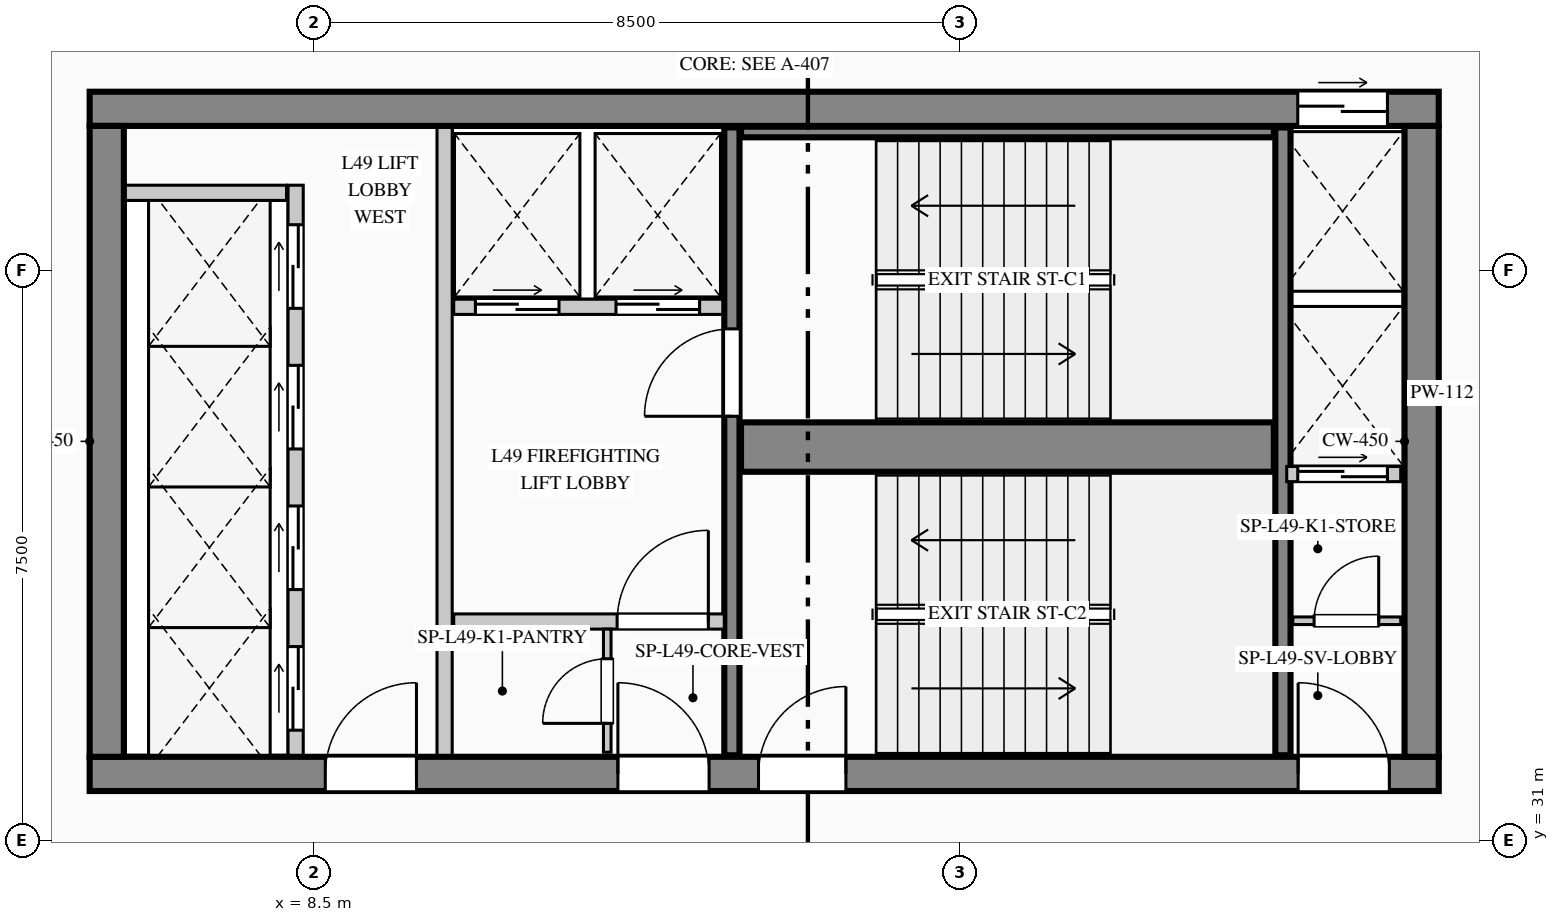
"""IFC4 building model, lengths in metres.
Left out: names, types, materials, properties, quantities, classifications, styles, units other than length and angle.
Written with IfcOpenShell. Run it as: python <this file> out.ifc"""

import sys

from ifc_helpers import new_model, si_unit, direction, frame, frame_2d, origin, place, context, subcontext, project, spatial, rectangle, extrude, element, fill, save


model = new_model("IFC4")
c1 = context("Model", 3, precision=1e-05, world=origin(), true_north=direction((0.0, 1.0)))
c2 = subcontext(c1, "Body", "Model", "MODEL_VIEW")
j1 = project(units=[si_unit("LENGTHUNIT", "METRE"), si_unit("PLANEANGLEUNIT", "RADIAN")], contexts=[c1])
p1 = place(None, origin())
s1 = spatial("IfcSite", under=j1, at=p1, CompositionType="ELEMENT")
p2 = place(p1, origin())
s2 = spatial("IfcBuilding", under=s1, at=p2, CompositionType="ELEMENT")
p3 = place(p2, frame((0.0, 0.0, 207.45)))
s3 = spatial("IfcBuildingStorey", under=s2, at=p3, CompositionType="ELEMENT", Elevation=207.45)
p4 = place(p3, frame((5.55, 40.625, 0.0), z_axis=(0.0, 0.0, 1.0), x_axis=(1.0, 0.0, 0.0)))
e1 = element("IfcWall", 1, at=p4, inside=s3, PredefinedType="SHEAR", context=c2, shape_type="SweptSolid", body=[
    extrude(rectangle(XDim=17.75, YDim=0.45, at=frame_2d((8.875, 0.0))), origin(), (0.0, 0.0, 1.0), 3.95),
])
p5 = place(p4, frame((15.895, 0.0, 0.0)))
e2 = element("IfcOpeningElement", 2, at=p5, cuts=e1, PredefinedType="OPENING", context=c2, shape_type="SweptSolid", body=[
    extrude(rectangle(XDim=1.18, YDim=2.25, at=frame_2d((0.59, 1.125))), frame((0.0, 0.235, 0.0), z_axis=(0.0, -1.0, 0.0), x_axis=(1.0, 0.0, 0.0)), (0.0, 0.0, 1.0), 0.47),
])
p6 = place(p3, frame((5.55, 31.875, 0.0), z_axis=(0.0, 0.0, 1.0), x_axis=(1.0, 0.0, 0.0)))
e3 = element("IfcWall", 3, at=p6, inside=s3, PredefinedType="SHEAR", context=c2, shape_type="SweptSolid", body=[
    extrude(rectangle(XDim=17.75, YDim=0.45, at=frame_2d((8.875, 0.0))), origin(), (0.0, 0.0, 1.0), 3.95),
])
p7 = place(p6, frame((3.1, 0.0, 0.0)))
e4 = element("IfcOpeningElement", 4, at=p7, cuts=e3, PredefinedType="OPENING", context=c2, shape_type="SweptSolid", body=[
    extrude(rectangle(XDim=1.2, YDim=2.2, at=frame_2d((0.6, 1.1))), frame((0.0, 0.235, 0.0), z_axis=(0.0, -1.0, 0.0), x_axis=(1.0, 0.0, 0.0)), (0.0, 0.0, 1.0), 0.47),
])
p8 = place(p6, frame((6.95, 0.0, 0.0)))
e5 = element("IfcOpeningElement", 5, at=p8, cuts=e3, PredefinedType="OPENING", context=c2, shape_type="SweptSolid", body=[
    extrude(rectangle(XDim=1.2, YDim=2.2, at=frame_2d((0.6, 1.1))), frame((0.0, 0.235, 0.0), z_axis=(0.0, -1.0, 0.0), x_axis=(1.0, 0.0, 0.0)), (0.0, 0.0, 1.0), 0.47),
])
p9 = place(p6, frame((8.8, 0.0, 0.0)))
e6 = element("IfcOpeningElement", 6, at=p9, cuts=e3, PredefinedType="OPENING", context=c2, shape_type="SweptSolid", body=[
    extrude(rectangle(XDim=1.15, YDim=2.2, at=frame_2d((0.575, 1.1))), frame((0.0, 0.235, 0.0), z_axis=(0.0, -1.0, 0.0), x_axis=(1.0, 0.0, 0.0)), (0.0, 0.0, 1.0), 0.47),
])
p10 = place(p6, frame((15.9, 0.0, 0.0)))
e7 = element("IfcOpeningElement", 7, at=p10, cuts=e3, PredefinedType="OPENING", context=c2, shape_type="SweptSolid", body=[
    extrude(rectangle(XDim=1.2, YDim=2.2, at=frame_2d((0.6, 1.1))), frame((0.0, 0.235, 0.0), z_axis=(0.0, -1.0, 0.0), x_axis=(1.0, 0.0, 0.0)), (0.0, 0.0, 1.0), 0.47),
])
for number, where, z_axis, x_axis in (
    (8, (5.775, 32.1, 0.0), (0.0, 0.0, 1.0), (0.0, 1.0, 0.0)),
    (9, (23.075, 32.1, 0.0), (0.0, 0.0, 1.0), (0.0, 1.0, 0.0)),
):
    element("IfcWall", number, at=place(p3, frame(where, z_axis=z_axis, x_axis=x_axis)), inside=s3, PredefinedType="SHEAR", context=c2, shape_type="SweptSolid", body=[
        extrude(rectangle(XDim=8.3, YDim=0.45, at=frame_2d((4.15, 0.0))), origin(), (0.0, 0.0, 1.0), 3.95),
    ])
p11 = place(p3, frame((14.0, 32.12, 0.0), z_axis=(0.0, 0.0, 1.0), x_axis=(0.0, 1.0, 0.0)))
e10 = element("IfcWall", 10, at=p11, inside=s3, PredefinedType="SHEAR", context=c2, shape_type="SweptSolid", body=[
    extrude(rectangle(XDim=8.26, YDim=0.2, at=frame_2d((4.13, 0.0))), origin(), (0.0, 0.0, 1.0), 3.95),
])
p12 = place(p11, frame((4.46, 0.0, 0.0)))
e11 = element("IfcOpeningElement", 11, at=p12, cuts=e10, PredefinedType="OPENING", context=c2, shape_type="SweptSolid", body=[
    extrude(rectangle(XDim=1.15, YDim=2.2, at=frame_2d((0.575, 1.1))), frame((0.0, 0.11, 0.0), z_axis=(0.0, -1.0, 0.0), x_axis=(1.0, 0.0, 0.0)), (0.0, 0.0, 1.0), 0.22),
])
p13 = place(p3, frame((14.12, 36.175, 0.0), z_axis=(0.0, 0.0, 1.0), x_axis=(1.0, 0.0, 0.0)))
e12 = element("IfcWall", 12, at=p13, inside=s3, PredefinedType="SHEAR", context=c2, shape_type="SweptSolid", body=[
    extrude(rectangle(XDim=7.01, YDim=0.65, at=frame_2d((3.505, 0.0))), origin(), (0.0, 0.0, 1.0), 3.95),
])
p14 = place(p3, frame((21.25, 32.12, 0.0), z_axis=(0.0, 0.0, 1.0), x_axis=(0.0, 1.0, 0.0)))
e13 = element("IfcWall", 13, at=p14, inside=s3, PredefinedType="SHEAR", context=c2, shape_type="SweptSolid", body=[
    extrude(rectangle(XDim=8.26, YDim=0.2, at=frame_2d((4.13, 0.0))), origin(), (0.0, 0.0, 1.0), 3.95),
])
p15 = place(p3, frame((14.12, 40.32, 0.0), z_axis=(0.0, 0.0, 1.0), x_axis=(1.0, 0.0, 0.0)))
e14 = element("IfcWall", 14, at=p15, inside=s3, PredefinedType="SHEAR", context=c2, shape_type="SweptSolid", body=[
    extrude(rectangle(XDim=7.01, YDim=0.14, at=frame_2d((3.505, 0.0))), origin(), (0.0, 0.0, 1.0), 3.95),
])
p16 = place(p3, frame((7.46, 4.62, 0.0), z_axis=(0.0, 0.0, 1.0), x_axis=(-0.123515576323, 0.992342633573, 0.0)))
e15 = element("IfcWall", 15, at=p16, inside=s3, PredefinedType="STANDARD", context=c2, shape_type="SweptSolid", body=[
    extrude(rectangle(XDim=37.043, YDim=0.24, at=frame_2d((18.522, 0.0))), origin(), (0.0, 0.0, 1.0), 3.7),
])
p17 = place(p16, frame((10.032, 0.0, 0.9)))
e16 = element("IfcOpeningElement", 16, at=p17, cuts=e15, PredefinedType="OPENING", context=c2, shape_type="SweptSolid", body=[
    extrude(rectangle(XDim=2.7, YDim=2.1, at=frame_2d((1.35, 1.05))), frame((0.0, 0.13, 0.0), z_axis=(0.0, -1.0, 0.0), x_axis=(1.0, 0.0, 0.0)), (0.0, 0.0, 1.0), 0.26),
])
p18 = place(p3, frame((8.26, 32.12, 0.0), z_axis=(0.0, 0.0, 1.0), x_axis=(0.0, 1.0, 0.0)))
e17 = element("IfcWall", 17, at=p18, inside=s3, PredefinedType="PARTITIONING", context=c2, shape_type="SweptSolid", body=[
    extrude(rectangle(XDim=7.5, YDim=0.2, at=frame_2d((3.75, 0.0))), origin(), (0.0, 0.0, 1.0), 3.7),
])
p19 = place(p18, frame((0.33, 0.0, 0.0)))
e18 = element("IfcOpeningElement", 18, at=p19, cuts=e17, PredefinedType="OPENING", context=c2, shape_type="SweptSolid", body=[
    extrude(rectangle(XDim=1.1, YDim=2.2, at=frame_2d((0.55, 1.1))), frame((0.0, 0.11, 0.0), z_axis=(0.0, -1.0, 0.0), x_axis=(1.0, 0.0, 0.0)), (0.0, 0.0, 1.0), 0.22),
])
p20 = place(p18, frame((2.18, 0.0, 0.0)))
e19 = element("IfcOpeningElement", 19, at=p20, cuts=e17, PredefinedType="OPENING", context=c2, shape_type="SweptSolid", body=[
    extrude(rectangle(XDim=1.1, YDim=2.2, at=frame_2d((0.55, 1.1))), frame((0.0, 0.11, 0.0), z_axis=(0.0, -1.0, 0.0), x_axis=(1.0, 0.0, 0.0)), (0.0, 0.0, 1.0), 0.22),
])
p21 = place(p18, frame((4.03, 0.0, 0.0)))
e20 = element("IfcOpeningElement", 20, at=p21, cuts=e17, PredefinedType="OPENING", context=c2, shape_type="SweptSolid", body=[
    extrude(rectangle(XDim=1.1, YDim=2.2, at=frame_2d((0.55, 1.1))), frame((0.0, 0.11, 0.0), z_axis=(0.0, -1.0, 0.0), x_axis=(1.0, 0.0, 0.0)), (0.0, 0.0, 1.0), 0.22),
])
p22 = place(p18, frame((5.88, 0.0, 0.0)))
e21 = element("IfcOpeningElement", 21, at=p22, cuts=e17, PredefinedType="OPENING", context=c2, shape_type="SweptSolid", body=[
    extrude(rectangle(XDim=1.1, YDim=2.2, at=frame_2d((0.55, 1.1))), frame((0.0, 0.11, 0.0), z_axis=(0.0, -1.0, 0.0), x_axis=(1.0, 0.0, 0.0)), (0.0, 0.0, 1.0), 0.22),
])
p23 = place(p3, frame((6.02, 39.52, 0.0), z_axis=(0.0, 0.0, 1.0), x_axis=(1.0, 0.0, 0.0)))
e22 = element("IfcWall", 22, at=p23, inside=s3, PredefinedType="PARTITIONING", context=c2, shape_type="SweptSolid", body=[
    extrude(rectangle(XDim=2.12, YDim=0.2, at=frame_2d((1.06, 0.0))), origin(), (0.0, 0.0, 1.0), 3.7),
])
p24 = place(p3, frame((10.22, 32.12, 0.0), z_axis=(0.0, 0.0, 1.0), x_axis=(0.0, 1.0, 0.0)))
e23 = element("IfcWall", 23, at=p24, inside=s3, PredefinedType="PARTITIONING", context=c2, shape_type="SweptSolid", body=[
    extrude(rectangle(XDim=8.26, YDim=0.2, at=frame_2d((4.13, 0.0))), origin(), (0.0, 0.0, 1.0), 3.7),
])
p25 = place(p3, frame((10.34, 38.02, 0.0), z_axis=(0.0, 0.0, 1.0), x_axis=(1.0, 0.0, 0.0)))
e24 = element("IfcWall", 24, at=p25, inside=s3, PredefinedType="PARTITIONING", context=c2, shape_type="SweptSolid", body=[
    extrude(rectangle(XDim=3.54, YDim=0.2, at=frame_2d((1.77, 0.0))), origin(), (0.0, 0.0, 1.0), 3.7),
])
p26 = place(p25, frame((0.285, 0.0, 0.0)))
e25 = element("IfcOpeningElement", 25, at=p26, cuts=e24, PredefinedType="OPENING", context=c2, shape_type="SweptSolid", body=[
    extrude(rectangle(XDim=1.1, YDim=2.2, at=frame_2d((0.55, 1.1))), frame((0.0, 0.11, 0.0), z_axis=(0.0, -1.0, 0.0), x_axis=(1.0, 0.0, 0.0)), (0.0, 0.0, 1.0), 0.22),
])
p27 = place(p25, frame((2.135, 0.0, 0.0)))
e26 = element("IfcOpeningElement", 26, at=p27, cuts=e24, PredefinedType="OPENING", context=c2, shape_type="SweptSolid", body=[
    extrude(rectangle(XDim=1.1, YDim=2.2, at=frame_2d((0.55, 1.1))), frame((0.0, 0.11, 0.0), z_axis=(0.0, -1.0, 0.0), x_axis=(1.0, 0.0, 0.0)), (0.0, 0.0, 1.0), 0.22),
])
p28 = place(p3, frame((10.34, 33.88, 0.0), z_axis=(0.0, 0.0, 1.0), x_axis=(1.0, 0.0, 0.0)))
e27 = element("IfcWall", 27, at=p28, inside=s3, PredefinedType="PARTITIONING", context=c2, shape_type="SweptSolid", body=[
    extrude(rectangle(XDim=3.56, YDim=0.2, at=frame_2d((1.78, 0.0))), origin(), (0.0, 0.0, 1.0), 3.7),
])
p29 = place(p28, frame((2.15, 0.0, 0.0)))
e28 = element("IfcOpeningElement", 28, at=p29, cuts=e27, PredefinedType="OPENING", context=c2, shape_type="SweptSolid", body=[
    extrude(rectangle(XDim=1.2, YDim=2.2, at=frame_2d((0.6, 1.1))), frame((0.0, 0.11, 0.0), z_axis=(0.0, -1.0, 0.0), x_axis=(1.0, 0.0, 0.0)), (0.0, 0.0, 1.0), 0.22),
])
p30 = place(p3, frame((12.36, 32.16, 0.0), z_axis=(0.0, 0.0, 1.0), x_axis=(0.0, 1.0, 0.0)))
e29 = element("IfcWall", 29, at=p30, inside=s3, PredefinedType="PARTITIONING", context=c2, shape_type="SweptSolid", body=[
    extrude(rectangle(XDim=1.62, YDim=0.1, at=frame_2d((0.81, 0.0))), origin(), (0.0, 0.0, 1.0), 3.7),
])
p31 = place(p30, frame((0.38, 0.0, 0.0)))
e30 = element("IfcOpeningElement", 30, at=p31, cuts=e29, PredefinedType="OPENING", context=c2, shape_type="SweptSolid", body=[
    extrude(rectangle(XDim=0.85, YDim=2.1, at=frame_2d((0.425, 1.05))), frame((0.0, 0.06, 0.0), z_axis=(0.0, -1.0, 0.0), x_axis=(1.0, 0.0, 0.0)), (0.0, 0.0, 1.0), 0.12),
])
p32 = place(p3, frame((21.38, 33.89, 0.0), z_axis=(0.0, 0.0, 1.0), x_axis=(1.0, 0.0, 0.0)))
e31 = element("IfcWall", 31, at=p32, inside=s3, PredefinedType="PARTITIONING", context=c2, shape_type="SweptSolid", body=[
    extrude(rectangle(XDim=1.42, YDim=0.1, at=frame_2d((0.71, 0.0))), origin(), (0.0, 0.0, 1.0), 3.7),
])
p33 = place(p32, frame((0.28, 0.0, 0.0)))
e32 = element("IfcOpeningElement", 32, at=p33, cuts=e31, PredefinedType="OPENING", context=c2, shape_type="SweptSolid", body=[
    extrude(rectangle(XDim=0.85, YDim=2.1, at=frame_2d((0.425, 1.05))), frame((0.0, 0.06, 0.0), z_axis=(0.0, -1.0, 0.0), x_axis=(1.0, 0.0, 0.0)), (0.0, 0.0, 1.0), 0.12),
])
p34 = place(p3, frame((21.3, 35.82, 0.0), z_axis=(0.0, 0.0, 1.0), x_axis=(1.0, 0.0, 0.0)))
e33 = element("IfcWall", 33, at=p34, inside=s3, PredefinedType="PARTITIONING", context=c2, shape_type="SweptSolid", body=[
    extrude(rectangle(XDim=1.5, YDim=0.2, at=frame_2d((0.75, 0.0))), origin(), (0.0, 0.0, 1.0), 3.7),
])
p35 = place(p34, frame((0.145, 0.0, 0.0)))
e34 = element("IfcOpeningElement", 34, at=p35, cuts=e33, PredefinedType="OPENING", context=c2, shape_type="SweptSolid", body=[
    extrude(rectangle(XDim=1.18, YDim=2.25, at=frame_2d((0.59, 1.125))), frame((0.0, 0.11, 0.0), z_axis=(0.0, -1.0, 0.0), x_axis=(1.0, 0.0, 0.0)), (0.0, 0.0, 1.0), 0.22),
])
p36 = place(p7, origin())
e35 = element("IfcDoor", 35, at=p36, inside=s3, OperationType="SINGLE_SWING_RIGHT", PredefinedType="DOOR", context=c2, shape_type="SweptSolid", body=[
    extrude(rectangle(XDim=1.2, YDim=2.2, at=frame_2d((0.6, 1.1))), frame((0.0, 0.025, 0.0), z_axis=(0.0, -1.0, 0.0), x_axis=(1.0, 0.0, 0.0)), (0.0, 0.0, 1.0), 0.05),
])
fill(e4, e35)
p37 = place(p8, origin())
e36 = element("IfcDoor", 36, at=p37, inside=s3, OperationType="SINGLE_SWING_LEFT", PredefinedType="DOOR", context=c2, shape_type="SweptSolid", body=[
    extrude(rectangle(XDim=1.2, YDim=2.2, at=frame_2d((0.6, 1.1))), frame((0.0, 0.025, 0.0), z_axis=(0.0, -1.0, 0.0), x_axis=(1.0, 0.0, 0.0)), (0.0, 0.0, 1.0), 0.05),
])
fill(e5, e36)
p38 = place(p9, origin())
e37 = element("IfcDoor", 37, at=p38, inside=s3, OperationType="SINGLE_SWING_RIGHT", PredefinedType="DOOR", context=c2, shape_type="SweptSolid", body=[
    extrude(rectangle(XDim=1.15, YDim=2.2, at=frame_2d((0.575, 1.1))), frame((0.0, 0.025, 0.0), z_axis=(0.0, -1.0, 0.0), x_axis=(1.0, 0.0, 0.0)), (0.0, 0.0, 1.0), 0.05),
])
fill(e6, e37)
p39 = place(p10, origin())
e38 = element("IfcDoor", 38, at=p39, inside=s3, OperationType="SINGLE_SWING_LEFT", PredefinedType="DOOR", context=c2, shape_type="SweptSolid", body=[
    extrude(rectangle(XDim=1.2, YDim=2.2, at=frame_2d((0.6, 1.1))), frame((0.0, 0.025, 0.0), z_axis=(0.0, -1.0, 0.0), x_axis=(1.0, 0.0, 0.0)), (0.0, 0.0, 1.0), 0.05),
])
fill(e7, e38)
p40 = place(p29, origin())
e39 = element("IfcDoor", 39, at=p40, inside=s3, OperationType="SINGLE_SWING_RIGHT", PredefinedType="DOOR", context=c2, shape_type="SweptSolid", body=[
    extrude(rectangle(XDim=1.2, YDim=2.2, at=frame_2d((0.6, 1.1))), frame((0.0, 0.025, 0.0), z_axis=(0.0, -1.0, 0.0), x_axis=(1.0, 0.0, 0.0)), (0.0, 0.0, 1.0), 0.05),
])
fill(e28, e39)
p41 = place(p31, origin())
e40 = element("IfcDoor", 40, at=p41, inside=s3, OperationType="SINGLE_SWING_LEFT", PredefinedType="DOOR", context=c2, shape_type="SweptSolid", body=[
    extrude(rectangle(XDim=0.85, YDim=2.1, at=frame_2d((0.425, 1.05))), frame((0.0, 0.025, 0.0), z_axis=(0.0, -1.0, 0.0), x_axis=(1.0, 0.0, 0.0)), (0.0, 0.0, 1.0), 0.05),
])
fill(e30, e40)
p42 = place(p33, origin())
e41 = element("IfcDoor", 41, at=p42, inside=s3, OperationType="SINGLE_SWING_RIGHT", PredefinedType="DOOR", context=c2, shape_type="SweptSolid", body=[
    extrude(rectangle(XDim=0.85, YDim=2.1, at=frame_2d((0.425, 1.05))), frame((0.0, 0.025, 0.0), z_axis=(0.0, -1.0, 0.0), x_axis=(1.0, 0.0, 0.0)), (0.0, 0.0, 1.0), 0.05),
])
fill(e32, e41)
p43 = place(p12, origin())
e42 = element("IfcDoor", 42, at=p43, inside=s3, OperationType="SINGLE_SWING_LEFT", PredefinedType="DOOR", context=c2, shape_type="SweptSolid", body=[
    extrude(rectangle(XDim=1.15, YDim=2.2, at=frame_2d((0.575, 1.1))), frame((0.0, 0.025, 0.0), z_axis=(0.0, -1.0, 0.0), x_axis=(1.0, 0.0, 0.0)), (0.0, 0.0, 1.0), 0.05),
])
fill(e11, e42)
p44 = place(p19, origin())
e43 = element("IfcDoor", 43, at=p44, inside=s3, OperationType="DOUBLE_DOOR_SLIDING", PredefinedType="DOOR", context=c2, shape_type="SweptSolid", body=[
    extrude(rectangle(XDim=1.1, YDim=2.2, at=frame_2d((0.55, 1.1))), frame((0.0, 0.025, 0.0), z_axis=(0.0, -1.0, 0.0), x_axis=(1.0, 0.0, 0.0)), (0.0, 0.0, 1.0), 0.05),
])
fill(e18, e43)
p45 = place(p20, origin())
e44 = element("IfcDoor", 44, at=p45, inside=s3, OperationType="DOUBLE_DOOR_SLIDING", PredefinedType="DOOR", context=c2, shape_type="SweptSolid", body=[
    extrude(rectangle(XDim=1.1, YDim=2.2, at=frame_2d((0.55, 1.1))), frame((0.0, 0.025, 0.0), z_axis=(0.0, -1.0, 0.0), x_axis=(1.0, 0.0, 0.0)), (0.0, 0.0, 1.0), 0.05),
])
fill(e19, e44)
p46 = place(p21, origin())
e45 = element("IfcDoor", 45, at=p46, inside=s3, OperationType="DOUBLE_DOOR_SLIDING", PredefinedType="DOOR", context=c2, shape_type="SweptSolid", body=[
    extrude(rectangle(XDim=1.1, YDim=2.2, at=frame_2d((0.55, 1.1))), frame((0.0, 0.025, 0.0), z_axis=(0.0, -1.0, 0.0), x_axis=(1.0, 0.0, 0.0)), (0.0, 0.0, 1.0), 0.05),
])
fill(e20, e45)
p47 = place(p22, origin())
e46 = element("IfcDoor", 46, at=p47, inside=s3, OperationType="DOUBLE_DOOR_SLIDING", PredefinedType="DOOR", context=c2, shape_type="SweptSolid", body=[
    extrude(rectangle(XDim=1.1, YDim=2.2, at=frame_2d((0.55, 1.1))), frame((0.0, 0.025, 0.0), z_axis=(0.0, -1.0, 0.0), x_axis=(1.0, 0.0, 0.0)), (0.0, 0.0, 1.0), 0.05),
])
fill(e21, e46)
p48 = place(p26, origin())
e47 = element("IfcDoor", 47, at=p48, inside=s3, OperationType="DOUBLE_DOOR_SLIDING", PredefinedType="DOOR", context=c2, shape_type="SweptSolid", body=[
    extrude(rectangle(XDim=1.1, YDim=2.2, at=frame_2d((0.55, 1.1))), frame((0.0, 0.025, 0.0), z_axis=(0.0, -1.0, 0.0), x_axis=(1.0, 0.0, 0.0)), (0.0, 0.0, 1.0), 0.05),
])
fill(e25, e47)
p49 = place(p27, origin())
e48 = element("IfcDoor", 48, at=p49, inside=s3, OperationType="DOUBLE_DOOR_SLIDING", PredefinedType="DOOR", context=c2, shape_type="SweptSolid", body=[
    extrude(rectangle(XDim=1.1, YDim=2.2, at=frame_2d((0.55, 1.1))), frame((0.0, 0.025, 0.0), z_axis=(0.0, -1.0, 0.0), x_axis=(1.0, 0.0, 0.0)), (0.0, 0.0, 1.0), 0.05),
])
fill(e26, e48)
p50 = place(p5, origin())
e49 = element("IfcDoor", 49, at=p50, inside=s3, OperationType="DOUBLE_DOOR_SLIDING", PredefinedType="DOOR", context=c2, shape_type="SweptSolid", body=[
    extrude(rectangle(XDim=1.18, YDim=2.25, at=frame_2d((0.59, 1.125))), frame((0.0, 0.025, 0.0), z_axis=(0.0, -1.0, 0.0), x_axis=(1.0, 0.0, 0.0)), (0.0, 0.0, 1.0), 0.05),
])
fill(e2, e49)
p51 = place(p35, origin())
e50 = element("IfcDoor", 50, at=p51, inside=s3, OperationType="DOUBLE_DOOR_SLIDING", PredefinedType="DOOR", context=c2, shape_type="SweptSolid", body=[
    extrude(rectangle(XDim=1.18, YDim=2.25, at=frame_2d((0.59, 1.125))), frame((0.0, 0.025, 0.0), z_axis=(0.0, -1.0, 0.0), x_axis=(1.0, 0.0, 0.0)), (0.0, 0.0, 1.0), 0.05),
])
fill(e34, e50)
save(model, sys.argv[1])
